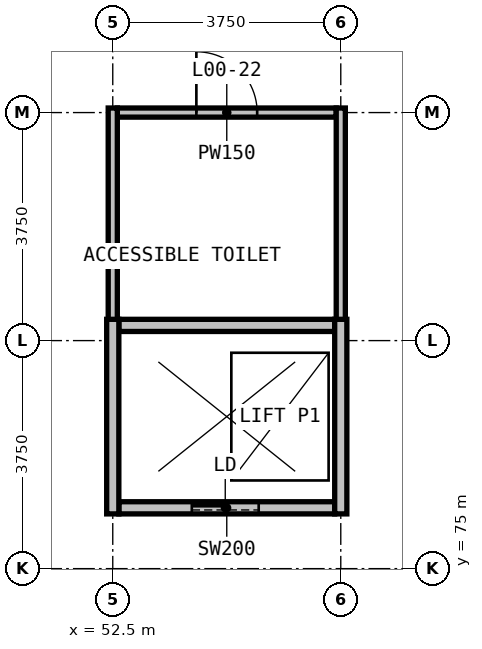
"""IFC4 building model, lengths in metres.
Left out: names, types, materials, properties, quantities, classifications, styles, units other than length and angle.
Written with IfcOpenShell. Run it as: python <this file> out.ifc"""

import sys

from ifc_helpers import new_model, si_unit, direction, frame, frame_2d, origin, place, context, subcontext, project, spatial, rectangle, extrude, element, fill, save


model = new_model("IFC4")
c1 = context("Model", 3, precision=1e-05, world=origin(), true_north=direction((0.0, 1.0)))
c2 = subcontext(c1, "Body", "Model", "MODEL_VIEW")
j1 = project(units=[si_unit("LENGTHUNIT", "METRE"), si_unit("PLANEANGLEUNIT", "RADIAN")], contexts=[c1])
p1 = place(None, origin())
s1 = spatial("IfcSite", under=j1, at=p1, CompositionType="ELEMENT")
p2 = place(p1, origin())
s2 = spatial("IfcBuilding", under=s1, at=p2, CompositionType="ELEMENT")
p3 = place(p2, origin())
s3 = spatial("IfcBuildingStorey", under=s2, at=p3, CompositionType="ELEMENT", Elevation=0.0)
p4 = place(p3, frame((52.575, 82.5, 0.0), z_axis=(0.0, 0.0, 1.0), x_axis=(1.0, 0.0, 0.0)))
e1 = element("IfcWall", 1, at=p4, inside=s3, PredefinedType="PARTITIONING", context=c2, shape_type="SweptSolid", body=[
    extrude(rectangle(XDim=3.6, YDim=0.15, at=frame_2d((1.8, 0.0))), origin(), (0.0, 0.0, 1.0), 7.15),
])
p5 = place(p4, frame((1.3, 0.0, 0.0)))
e2 = element("IfcOpeningElement", 2, at=p5, cuts=e1, PredefinedType="OPENING", context=c2, shape_type="SweptSolid", body=[
    extrude(rectangle(XDim=1.0, YDim=2.2, at=frame_2d((0.5, 1.1))), frame((0.0, 0.085, 0.0), z_axis=(0.0, -1.0, 0.0), x_axis=(1.0, 0.0, 0.0)), (0.0, 0.0, 1.0), 0.17),
])
for number, where, z_axis, x_axis in (
    (3, (52.5, 78.9, 0.0), (0.0, 0.0, 1.0), (0.0, 1.0, 0.0)),
    (4, (56.25, 78.9, 0.0), (0.0, 0.0, 1.0), (0.0, 1.0, 0.0)),
):
    element("IfcWall", number, at=place(p3, frame(where, z_axis=z_axis, x_axis=x_axis)), inside=s3, PredefinedType="PARTITIONING", context=c2, shape_type="SweptSolid", body=[
        extrude(rectangle(XDim=3.675, YDim=0.15, at=frame_2d((1.837, 0.0))), origin(), (0.0, 0.0, 1.0), 7.15),
    ])
p6 = place(p3, frame((52.6, 76.0, 0.0), z_axis=(0.0, 0.0, 1.0), x_axis=(1.0, 0.0, 0.0)))
e5 = element("IfcWall", 5, at=p6, inside=s3, PredefinedType="PARTITIONING", context=c2, shape_type="SweptSolid", body=[
    extrude(rectangle(XDim=3.55, YDim=0.2, at=frame_2d((1.775, 0.0))), origin(), (0.0, 0.0, 1.0), 7.15),
])
p7 = place(p6, frame((1.2, 0.0, 0.0)))
e6 = element("IfcOpeningElement", 6, at=p7, cuts=e5, PredefinedType="OPENING", context=c2, shape_type="SweptSolid", body=[
    extrude(rectangle(XDim=1.1, YDim=2.2, at=frame_2d((0.55, 1.1))), frame((0.0, 0.11, 0.0), z_axis=(0.0, -1.0, 0.0), x_axis=(1.0, 0.0, 0.0)), (0.0, 0.0, 1.0), 0.22),
])
p8 = place(p3, frame((52.6, 79.0, 0.0), z_axis=(0.0, 0.0, 1.0), x_axis=(1.0, 0.0, 0.0)))
e7 = element("IfcWall", 7, at=p8, inside=s3, PredefinedType="PARTITIONING", context=c2, shape_type="SweptSolid", body=[
    extrude(rectangle(XDim=3.55, YDim=0.2, at=frame_2d((1.775, 0.0))), origin(), (0.0, 0.0, 1.0), 7.15),
])
for number, where, z_axis, x_axis in (
    (8, (52.5, 75.9, 0.0), (0.0, 0.0, 1.0), (0.0, 1.0, 0.0)),
    (9, (56.25, 75.9, 0.0), (0.0, 0.0, 1.0), (0.0, 1.0, 0.0)),
):
    element("IfcWall", number, at=place(p3, frame(where, z_axis=z_axis, x_axis=x_axis)), inside=s3, PredefinedType="PARTITIONING", context=c2, shape_type="SweptSolid", body=[
        extrude(rectangle(XDim=3.2, YDim=0.2, at=frame_2d((1.6, 0.0))), origin(), (0.0, 0.0, 1.0), 7.15),
    ])
p9 = place(p7, origin())
e10 = element("IfcDoor", 10, at=p9, inside=s3, OperationType="DOUBLE_DOOR_SLIDING", PredefinedType="DOOR", context=c2, shape_type="SweptSolid", body=[
    extrude(rectangle(XDim=1.1, YDim=2.2, at=frame_2d((0.55, 1.1))), frame((0.0, 0.025, 0.0), z_axis=(0.0, -1.0, 0.0), x_axis=(1.0, 0.0, 0.0)), (0.0, 0.0, 1.0), 0.05),
])
fill(e6, e10)
p10 = place(p5, origin())
e11 = element("IfcDoor", 11, at=p10, inside=s3, OperationType="SINGLE_SWING_LEFT", PredefinedType="DOOR", context=c2, shape_type="SweptSolid", body=[
    extrude(rectangle(XDim=1.0, YDim=2.2, at=frame_2d((0.5, 1.1))), frame((0.0, 0.025, 0.0), z_axis=(0.0, -1.0, 0.0), x_axis=(1.0, 0.0, 0.0)), (0.0, 0.0, 1.0), 0.05),
])
fill(e2, e11)
save(model, sys.argv[1])
